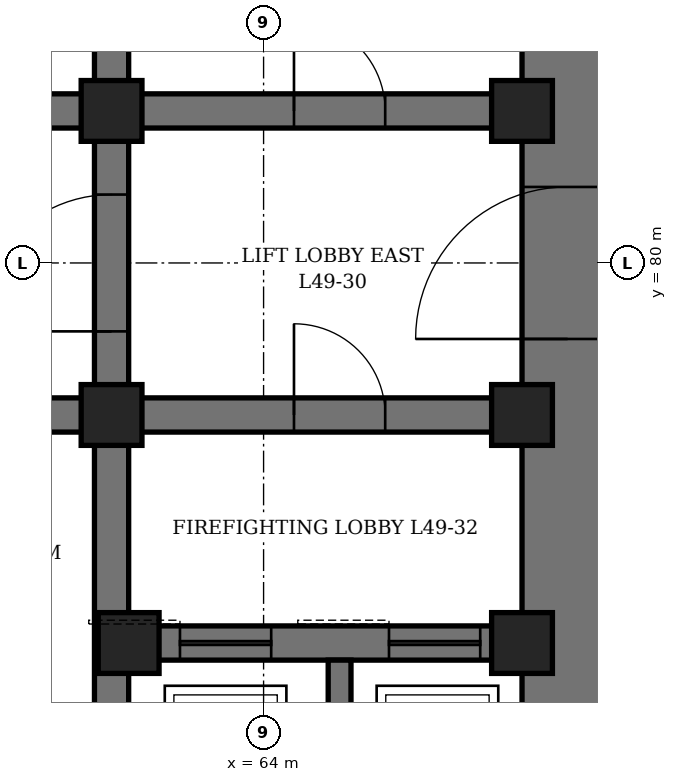
"""IFC4 building model, lengths in metres.
Left out: names, types, materials, properties, quantities, classifications, styles, units other than length and angle.
Written with IfcOpenShell. Run it as: python <this file> out.ifc"""

import sys

from ifc_helpers import new_model, si_unit, direction, frame, frame_2d, origin, origin_2d, place, context, subcontext, project, spatial, rectangle, hollow_rectangle, extrude, element, fill, save


model = new_model("IFC4")
c1 = context("Model", 3, precision=1e-05, world=origin(), true_north=direction((0.0, 1.0)))
c2 = subcontext(c1, "Body", "Model", "MODEL_VIEW")
j1 = project(units=[si_unit("LENGTHUNIT", "METRE"), si_unit("PLANEANGLEUNIT", "RADIAN")], contexts=[c1])
p1 = place(None, origin())
s1 = spatial("IfcSite", under=j1, at=p1, CompositionType="ELEMENT")
p2 = place(p1, origin())
s2 = spatial("IfcBuilding", under=s1, at=p2, CompositionType="ELEMENT")
p3 = place(p2, frame((0.0, 0.0, 219.1)))
s3 = spatial("IfcBuildingStorey", under=s2, at=p3, CompositionType="ELEMENT", Elevation=219.1)
p4 = place(p3, frame((68.0, 70.4, 0.0), z_axis=(0.0, 0.0, 1.0), x_axis=(0.0, 1.0, 0.0)))
e1 = element("IfcWall", 1, at=p4, inside=s3, PredefinedType="SHEAR", context=c2, shape_type="SweptSolid", body=[
    extrude(rectangle(XDim=19.2, YDim=1.2, at=frame_2d((9.6, 0.0))), origin(), (0.0, 0.0, 1.0), 4.2),
])
p5 = place(p4, frame((8.6, 0.0, 0.0)))
e2 = element("IfcOpeningElement", 2, at=p5, cuts=e1, PredefinedType="OPENING", context=c2, shape_type="SweptSolid", body=[
    extrude(rectangle(XDim=2.0, YDim=2.4, at=frame_2d((1.0, 1.2))), frame((0.0, 0.61, 0.0), z_axis=(0.0, -1.0, 0.0), x_axis=(1.0, 0.0, 0.0)), (0.0, 0.0, 1.0), 1.22),
])
p6 = place(p3, frame((62.0, 71.6, 0.0), z_axis=(0.0, 0.0, 1.0), x_axis=(0.0, 1.0, 0.0)))
e3 = element("IfcWall", 3, at=p6, inside=s3, PredefinedType="SHEAR", context=c2, shape_type="SweptSolid", body=[
    extrude(rectangle(XDim=16.8, YDim=0.45, at=frame_2d((8.4, 0.0))), origin(), (0.0, 0.0, 1.0), 4.2),
])
p7 = place(p6, frame((7.5, 0.0, 0.0)))
e4 = element("IfcOpeningElement", 4, at=p7, cuts=e3, PredefinedType="OPENING", context=c2, shape_type="SweptSolid", body=[
    extrude(rectangle(XDim=1.8, YDim=2.4, at=frame_2d((0.9, 1.2))), frame((0.0, 0.235, 0.0), z_axis=(0.0, -1.0, 0.0), x_axis=(1.0, 0.0, 0.0)), (0.0, 0.0, 1.0), 0.47),
])
p8 = place(p3, frame((62.225, 75.0, 0.0), z_axis=(0.0, 0.0, 1.0), x_axis=(1.0, 0.0, 0.0)))
e5 = element("IfcWall", 5, at=p8, inside=s3, PredefinedType="SHEAR", context=c2, shape_type="SweptSolid", body=[
    extrude(rectangle(XDim=5.175, YDim=0.45, at=frame_2d((2.587, 0.0))), origin(), (0.0, 0.0, 1.0), 4.2),
])
p9 = place(p8, frame((0.675, 0.0, 0.0)))
e6 = element("IfcOpeningElement", 6, at=p9, cuts=e5, PredefinedType="OPENING", context=c2, shape_type="SweptSolid", body=[
    extrude(rectangle(XDim=1.2, YDim=2.2, at=frame_2d((0.6, 1.1))), frame((0.0, 0.235, 0.0), z_axis=(0.0, -1.0, 0.0), x_axis=(1.0, 0.0, 0.0)), (0.0, 0.0, 1.0), 0.47),
])
p10 = place(p8, frame((3.425, 0.0, 0.0)))
e7 = element("IfcOpeningElement", 7, at=p10, cuts=e5, PredefinedType="OPENING", context=c2, shape_type="SweptSolid", body=[
    extrude(rectangle(XDim=1.2, YDim=2.2, at=frame_2d((0.6, 1.1))), frame((0.0, 0.235, 0.0), z_axis=(0.0, -1.0, 0.0), x_axis=(1.0, 0.0, 0.0)), (0.0, 0.0, 1.0), 0.47),
])
p11 = place(p3, frame((62.225, 78.0, 0.0), z_axis=(0.0, 0.0, 1.0), x_axis=(1.0, 0.0, 0.0)))
e8 = element("IfcWall", 8, at=p11, inside=s3, PredefinedType="SHEAR", context=c2, shape_type="SweptSolid", body=[
    extrude(rectangle(XDim=5.175, YDim=0.45, at=frame_2d((2.587, 0.0))), origin(), (0.0, 0.0, 1.0), 4.2),
])
p12 = place(p11, frame((2.175, 0.0, 0.0)))
e9 = element("IfcOpeningElement", 9, at=p12, cuts=e8, PredefinedType="OPENING", context=c2, shape_type="SweptSolid", body=[
    extrude(rectangle(XDim=1.2, YDim=2.1, at=frame_2d((0.6, 1.05))), frame((0.0, 0.235, 0.0), z_axis=(0.0, -1.0, 0.0), x_axis=(1.0, 0.0, 0.0)), (0.0, 0.0, 1.0), 0.47),
])
p13 = place(p3, frame((62.225, 82.0, 0.0), z_axis=(0.0, 0.0, 1.0), x_axis=(1.0, 0.0, 0.0)))
e10 = element("IfcWall", 10, at=p13, inside=s3, PredefinedType="SHEAR", context=c2, shape_type="SweptSolid", body=[
    extrude(rectangle(XDim=5.175, YDim=0.45, at=frame_2d((2.587, 0.0))), origin(), (0.0, 0.0, 1.0), 4.2),
])
p14 = place(p13, frame((2.175, 0.0, 0.0)))
e11 = element("IfcOpeningElement", 11, at=p14, cuts=e10, PredefinedType="OPENING", context=c2, shape_type="SweptSolid", body=[
    extrude(rectangle(XDim=1.2, YDim=2.1, at=frame_2d((0.6, 1.05))), frame((0.0, 0.235, 0.0), z_axis=(0.0, -1.0, 0.0), x_axis=(1.0, 0.0, 0.0)), (0.0, 0.0, 1.0), 0.47),
])
p15 = place(p3, frame((50.225, 78.0, 0.0), z_axis=(0.0, 0.0, 1.0), x_axis=(1.0, 0.0, 0.0)))
e12 = element("IfcWall", 12, at=p15, inside=s3, PredefinedType="SHEAR", context=c2, shape_type="SweptSolid", body=[
    extrude(rectangle(XDim=11.55, YDim=0.45, at=frame_2d((5.775, 0.0))), origin(), (0.0, 0.0, 1.0), 4.2),
])
p16 = place(p15, frame((0.825, 0.0, 0.0)))
e13 = element("IfcOpeningElement", 13, at=p16, cuts=e12, PredefinedType="OPENING", context=c2, shape_type="SweptSolid", body=[
    extrude(rectangle(XDim=0.9, YDim=2.1, at=frame_2d((0.45, 1.05))), frame((0.0, 0.235, 0.0), z_axis=(0.0, -1.0, 0.0), x_axis=(1.0, 0.0, 0.0)), (0.0, 0.0, 1.0), 0.47),
])
p17 = place(p15, frame((3.825, 0.0, 0.0)))
e14 = element("IfcOpeningElement", 14, at=p17, cuts=e12, PredefinedType="OPENING", context=c2, shape_type="SweptSolid", body=[
    extrude(rectangle(XDim=0.9, YDim=2.1, at=frame_2d((0.45, 1.05))), frame((0.0, 0.235, 0.0), z_axis=(0.0, -1.0, 0.0), x_axis=(1.0, 0.0, 0.0)), (0.0, 0.0, 1.0), 0.47),
])
p18 = place(p15, frame((6.825, 0.0, 0.0)))
e15 = element("IfcOpeningElement", 15, at=p18, cuts=e12, PredefinedType="OPENING", context=c2, shape_type="SweptSolid", body=[
    extrude(rectangle(XDim=0.9, YDim=2.1, at=frame_2d((0.45, 1.05))), frame((0.0, 0.235, 0.0), z_axis=(0.0, -1.0, 0.0), x_axis=(1.0, 0.0, 0.0)), (0.0, 0.0, 1.0), 0.47),
])
p19 = place(p15, frame((9.825, 0.0, 0.0)))
e16 = element("IfcOpeningElement", 16, at=p19, cuts=e12, PredefinedType="OPENING", context=c2, shape_type="SweptSolid", body=[
    extrude(rectangle(XDim=0.9, YDim=2.1, at=frame_2d((0.45, 1.05))), frame((0.0, 0.235, 0.0), z_axis=(0.0, -1.0, 0.0), x_axis=(1.0, 0.0, 0.0)), (0.0, 0.0, 1.0), 0.47),
])
p20 = place(p3, frame((50.225, 82.0, 0.0), z_axis=(0.0, 0.0, 1.0), x_axis=(1.0, 0.0, 0.0)))
e17 = element("IfcWall", 17, at=p20, inside=s3, PredefinedType="SHEAR", context=c2, shape_type="SweptSolid", body=[
    extrude(rectangle(XDim=11.55, YDim=0.45, at=frame_2d((5.775, 0.0))), origin(), (0.0, 0.0, 1.0), 4.2),
])
p21 = place(p20, frame((0.825, 0.0, 0.0)))
e18 = element("IfcOpeningElement", 18, at=p21, cuts=e17, PredefinedType="OPENING", context=c2, shape_type="SweptSolid", body=[
    extrude(rectangle(XDim=0.9, YDim=2.1, at=frame_2d((0.45, 1.05))), frame((0.0, 0.235, 0.0), z_axis=(0.0, -1.0, 0.0), x_axis=(1.0, 0.0, 0.0)), (0.0, 0.0, 1.0), 0.47),
])
p22 = place(p20, frame((3.825, 0.0, 0.0)))
e19 = element("IfcOpeningElement", 19, at=p22, cuts=e17, PredefinedType="OPENING", context=c2, shape_type="SweptSolid", body=[
    extrude(rectangle(XDim=0.9, YDim=2.1, at=frame_2d((0.45, 1.05))), frame((0.0, 0.235, 0.0), z_axis=(0.0, -1.0, 0.0), x_axis=(1.0, 0.0, 0.0)), (0.0, 0.0, 1.0), 0.47),
])
p23 = place(p20, frame((6.825, 0.0, 0.0)))
e20 = element("IfcOpeningElement", 20, at=p23, cuts=e17, PredefinedType="OPENING", context=c2, shape_type="SweptSolid", body=[
    extrude(rectangle(XDim=0.9, YDim=2.1, at=frame_2d((0.45, 1.05))), frame((0.0, 0.235, 0.0), z_axis=(0.0, -1.0, 0.0), x_axis=(1.0, 0.0, 0.0)), (0.0, 0.0, 1.0), 0.47),
])
p24 = place(p20, frame((9.825, 0.0, 0.0)))
e21 = element("IfcOpeningElement", 21, at=p24, cuts=e17, PredefinedType="OPENING", context=c2, shape_type="SweptSolid", body=[
    extrude(rectangle(XDim=0.9, YDim=2.1, at=frame_2d((0.45, 1.05))), frame((0.0, 0.235, 0.0), z_axis=(0.0, -1.0, 0.0), x_axis=(1.0, 0.0, 0.0)), (0.0, 0.0, 1.0), 0.47),
])
p25 = place(p3, frame((65.0, 71.6, 0.0), z_axis=(0.0, 0.0, 1.0), x_axis=(0.0, 1.0, 0.0)))
e22 = element("IfcWall", 22, at=p25, inside=s3, PredefinedType="SHEAR", context=c2, shape_type="SweptSolid", body=[
    extrude(rectangle(XDim=3.175, YDim=0.3, at=frame_2d((1.587, 0.0))), origin(), (0.0, 0.0, 1.0), 4.2),
])
for number, where, z_axis, x_axis in (
    (23, (62.0, 78.0, 0.0), (0.0, 0.0, 1.0), (1.0, 0.0, 0.0)),
    (24, (62.0, 82.0, 0.0), (0.0, 0.0, 1.0), (1.0, 0.0, 0.0)),
    (25, (62.225, 75.0, 0.0), (0.0, 0.0, 1.0), (1.0, 0.0, 0.0)),
    (26, (67.4, 75.0, 0.0), (0.0, 0.0, 1.0), (1.0, 0.0, 0.0)),
    (27, (67.4, 78.0, 0.0), (0.0, 0.0, 1.0), (1.0, 0.0, 0.0)),
    (28, (67.4, 82.0, 0.0), (0.0, 0.0, 1.0), (1.0, 0.0, 0.0)),
):
    element("IfcColumn", number, at=place(p3, frame(where, z_axis=z_axis, x_axis=x_axis)), inside=s3, PredefinedType="COLUMN", context=c2, shape_type="SweptSolid", body=[
        extrude(hollow_rectangle(XDim=0.8, YDim=0.8, WallThickness=0.1, at=origin_2d()), origin(), (0.0, 0.0, 1.0), 4.2),
    ])
p26 = place(p14, origin())
e29 = element("IfcDoor", 29, at=p26, inside=s3, OperationType="SINGLE_SWING_LEFT", PredefinedType="DOOR", context=c2, shape_type="SweptSolid", body=[
    extrude(rectangle(XDim=1.2, YDim=2.1, at=frame_2d((0.6, 1.05))), frame((0.0, 0.225, 0.0), z_axis=(0.0, -1.0, 0.0), x_axis=(1.0, 0.0, 0.0)), (0.0, 0.0, 1.0), 0.449),
])
fill(e11, e29)
p27 = place(p5, origin())
e30 = element("IfcDoor", 30, at=p27, inside=s3, OperationType="DOUBLE_DOOR_SINGLE_SWING", PredefinedType="DOOR", context=c2, shape_type="SweptSolid", body=[
    extrude(rectangle(XDim=2.0, YDim=2.4, at=frame_2d((1.0, 1.2))), frame((0.0, 0.35, 0.0), z_axis=(0.0, -1.0, 0.0), x_axis=(1.0, 0.0, 0.0)), (0.0, 0.0, 1.0), 0.7),
])
fill(e2, e30)
p28 = place(p7, origin())
e31 = element("IfcDoor", 31, at=p28, inside=s3, OperationType="DOUBLE_DOOR_SINGLE_SWING", PredefinedType="DOOR", context=c2, shape_type="SweptSolid", body=[
    extrude(rectangle(XDim=1.8, YDim=2.4, at=frame_2d((0.9, 1.2))), frame((0.0, 0.225, 0.0), z_axis=(0.0, -1.0, 0.0), x_axis=(1.0, 0.0, 0.0)), (0.0, 0.0, 1.0), 0.449),
])
fill(e4, e31)
p29 = place(p12, origin())
e32 = element("IfcDoor", 32, at=p29, inside=s3, OperationType="SINGLE_SWING_RIGHT", PredefinedType="DOOR", context=c2, shape_type="SweptSolid", body=[
    extrude(rectangle(XDim=1.2, YDim=2.1, at=frame_2d((0.6, 1.05))), frame((0.0, 0.225, 0.0), z_axis=(0.0, -1.0, 0.0), x_axis=(1.0, 0.0, 0.0)), (0.0, 0.0, 1.0), 0.449),
])
fill(e9, e32)
p30 = place(p9, origin())
e33 = element("IfcDoor", 33, at=p30, inside=s3, OperationType="SLIDING_TO_LEFT", PredefinedType="DOOR", context=c2, shape_type="SweptSolid", body=[
    extrude(rectangle(XDim=1.2, YDim=2.2, at=frame_2d((0.6, 1.1))), frame((0.0, 0.225, 0.0), z_axis=(0.0, -1.0, 0.0), x_axis=(1.0, 0.0, 0.0)), (0.0, 0.0, 1.0), 0.449),
])
fill(e6, e33)
p31 = place(p10, origin())
e34 = element("IfcDoor", 34, at=p31, inside=s3, OperationType="SLIDING_TO_LEFT", PredefinedType="DOOR", context=c2, shape_type="SweptSolid", body=[
    extrude(rectangle(XDim=1.2, YDim=2.2, at=frame_2d((0.6, 1.1))), frame((0.0, 0.225, 0.0), z_axis=(0.0, -1.0, 0.0), x_axis=(1.0, 0.0, 0.0)), (0.0, 0.0, 1.0), 0.449),
])
fill(e7, e34)
save(model, sys.argv[1])
